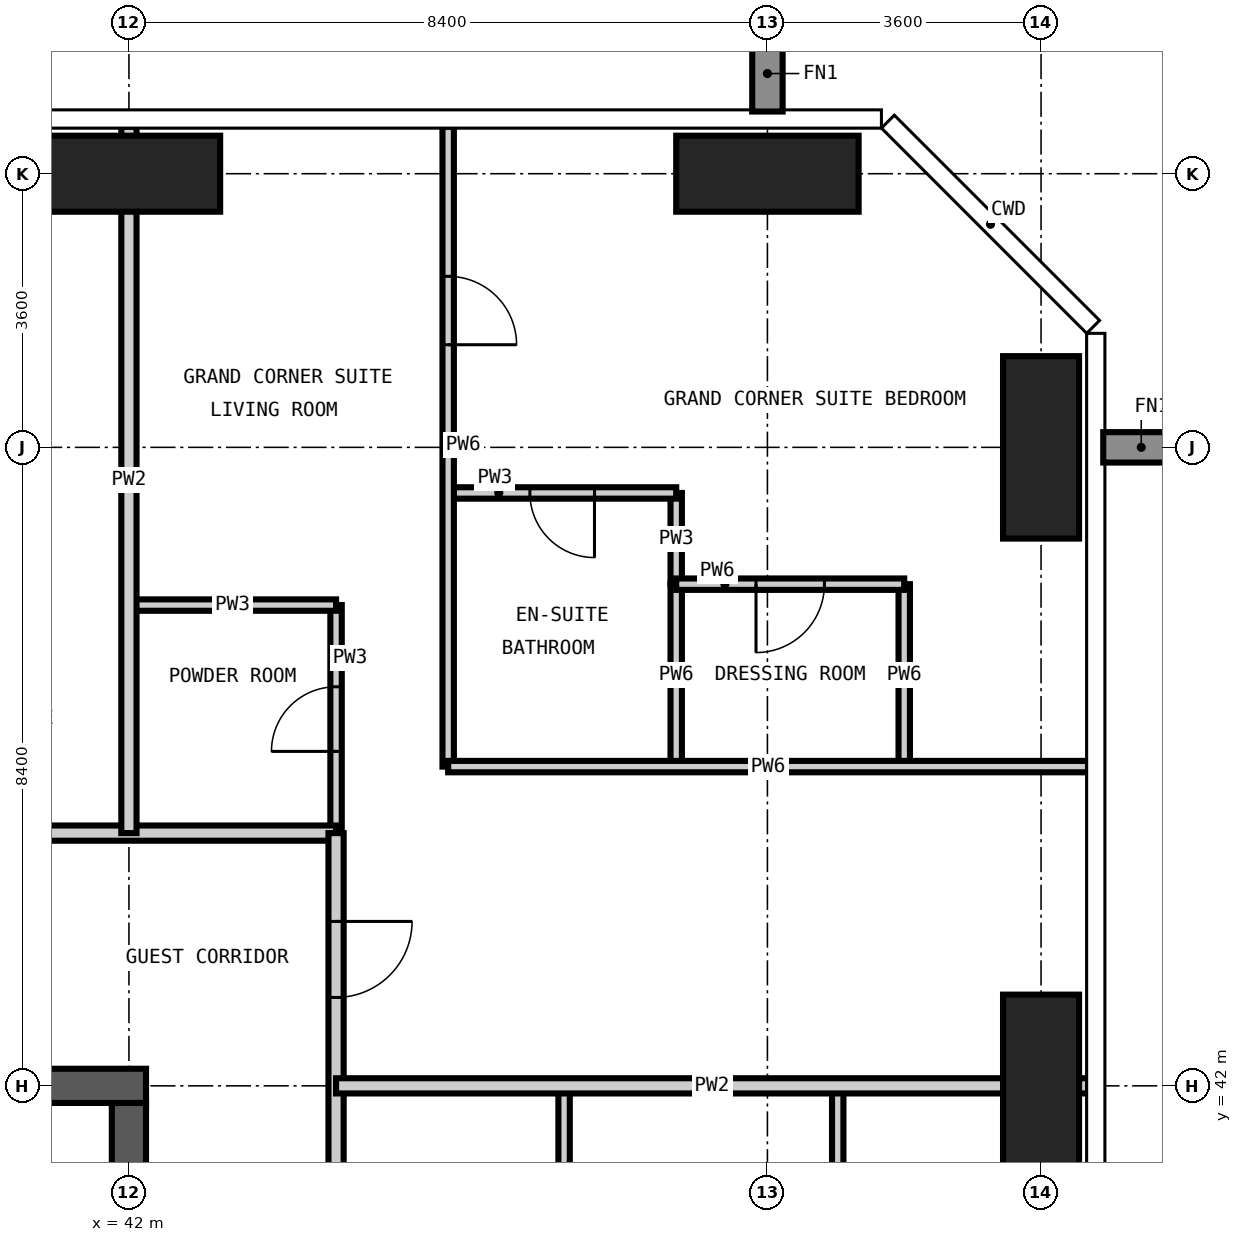
"""IFC4 building model, lengths in metres.
Left out: names, types, materials, properties, quantities, classifications, styles, units other than length and angle.
Written with IfcOpenShell. Run it as: python <this file> out.ifc"""

import sys

from ifc_helpers import new_model, si_unit, direction, frame, frame_2d, origin, origin_2d, place, context, subcontext, project, spatial, rectangle, extrude, element, fill, save


model = new_model("IFC4")
c1 = context("Model", 3, precision=1e-05, world=origin(), true_north=direction((0.0, 1.0)))
c2 = subcontext(c1, "Body", "Model", "MODEL_VIEW")
j1 = project(units=[si_unit("LENGTHUNIT", "METRE"), si_unit("PLANEANGLEUNIT", "RADIAN")], contexts=[c1])
p1 = place(None, origin())
s1 = spatial("IfcSite", under=j1, at=p1, CompositionType="ELEMENT")
p2 = place(p1, origin())
s2 = spatial("IfcBuilding", under=s1, at=p2, CompositionType="ELEMENT")
p3 = place(p2, frame((0.0, 0.0, 252.9)))
s3 = spatial("IfcBuildingStorey", under=s2, at=p3, CompositionType="ELEMENT", Elevation=252.9)
for number, where, z_axis, x_axis in (
    (1, (42.0, 54.0, -0.35), (0.0, 0.0, 1.0), (1.0, 0.0, 0.0)),
    (2, (50.4, 54.0, -0.35), (0.0, 0.0, 1.0), (1.0, 0.0, 0.0)),
):
    element("IfcColumn", number, at=place(p3, frame(where, z_axis=z_axis, x_axis=x_axis)), inside=s3, PredefinedType="COLUMN", context=c2, shape_type="SweptSolid", body=[
        extrude(rectangle(XDim=2.4, YDim=1.0, at=origin_2d()), origin(), (0.0, 0.0, 1.0), 3.9),
    ])
for number, where, z_axis, x_axis in (
    (3, (54.0, 42.0, -0.35), (0.0, 0.0, 1.0), (1.0, 0.0, 0.0)),
    (4, (54.0, 50.4, -0.35), (0.0, 0.0, 1.0), (1.0, 0.0, 0.0)),
):
    element("IfcColumn", number, at=place(p3, frame(where, z_axis=z_axis, x_axis=x_axis)), inside=s3, PredefinedType="COLUMN", context=c2, shape_type="SweptSolid", body=[
        extrude(rectangle(XDim=1.0, YDim=2.4, at=origin_2d()), origin(), (0.0, 0.0, 1.0), 3.9),
    ])
p4 = place(p3, frame((42.0, 17.025, -0.35), z_axis=(0.0, 0.0, 1.0), x_axis=(0.0, 1.0, 0.0)))
e5 = element("IfcWall", 5, at=p4, inside=s3, PredefinedType="SHEAR", context=c2, shape_type="SweptSolid", body=[
    extrude(rectangle(XDim=24.75, YDim=0.45, at=frame_2d((12.375, 0.0))), origin(), (0.0, 0.0, 1.0), 3.9),
])
p5 = place(p4, frame((0.575, 0.0, 0.35)))
e6 = element("IfcOpeningElement", 6, at=p5, cuts=e5, PredefinedType="OPENING", context=c2, shape_type="SweptSolid", body=[
    extrude(rectangle(XDim=1.2, YDim=2.2, at=frame_2d((0.6, 1.1))), frame((0.0, 0.235, 0.0), z_axis=(0.0, -1.0, 0.0), x_axis=(1.0, 0.0, 0.0)), (0.0, 0.0, 1.0), 0.47),
])
p6 = place(p4, frame((11.475, 0.0, 0.35)))
e7 = element("IfcOpeningElement", 7, at=p6, cuts=e5, PredefinedType="OPENING", context=c2, shape_type="SweptSolid", body=[
    extrude(rectangle(XDim=1.8, YDim=2.2, at=frame_2d((0.9, 1.1))), frame((0.0, 0.235, 0.0), z_axis=(0.0, -1.0, 0.0), x_axis=(1.0, 0.0, 0.0)), (0.0, 0.0, 1.0), 0.47),
])
p7 = place(p4, frame((20.275, 0.0, 0.35)))
e8 = element("IfcOpeningElement", 8, at=p7, cuts=e5, PredefinedType="OPENING", context=c2, shape_type="SweptSolid", body=[
    extrude(rectangle(XDim=1.0, YDim=2.1, at=frame_2d((0.5, 1.05))), frame((0.0, 0.235, 0.0), z_axis=(0.0, -1.0, 0.0), x_axis=(1.0, 0.0, 0.0)), (0.0, 0.0, 1.0), 0.47),
])
p8 = place(p3, frame((42.225, 42.0, -0.35), z_axis=(0.0, 0.0, 1.0), x_axis=(-1.0, 0.0, 0.0)))
e9 = element("IfcWall", 9, at=p8, inside=s3, PredefinedType="SHEAR", context=c2, shape_type="SweptSolid", body=[
    extrude(rectangle(XDim=17.25, YDim=0.45, at=frame_2d((8.625, 0.0))), origin(), (0.0, 0.0, 1.0), 3.9),
])
p9 = place(p8, frame((10.125, 0.0, 0.35)))
e10 = element("IfcOpeningElement", 10, at=p9, cuts=e9, PredefinedType="OPENING", context=c2, shape_type="SweptSolid", body=[
    extrude(rectangle(XDim=1.2, YDim=2.2, at=frame_2d((0.6, 1.1))), frame((0.0, 0.235, 0.0), z_axis=(0.0, -1.0, 0.0), x_axis=(1.0, 0.0, 0.0)), (0.0, 0.0, 1.0), 0.47),
])
p10 = place(p3, frame((44.725, 45.325, 0.0), z_axis=(0.0, 0.0, 1.0), x_axis=(0.0, 1.0, 0.0)))
e11 = element("IfcWall", 11, at=p10, inside=s3, PredefinedType="PARTITIONING", context=c2, shape_type="SweptSolid", body=[
    extrude(rectangle(XDim=3.0, YDim=0.15, at=frame_2d((1.5, 0.0))), origin(), (0.0, 0.0, 1.0), 3.55),
])
p11 = place(p10, frame((1.075, 0.0, 0.0)))
e12 = element("IfcOpeningElement", 12, at=p11, cuts=e11, PredefinedType="OPENING", context=c2, shape_type="SweptSolid", body=[
    extrude(rectangle(XDim=0.85, YDim=2.1, at=frame_2d((0.425, 1.05))), frame((0.0, 0.085, 0.0), z_axis=(0.0, -1.0, 0.0), x_axis=(1.0, 0.0, 0.0)), (0.0, 0.0, 1.0), 0.17),
])
p12 = place(p3, frame((47.725, 39.3, 0.0), z_axis=(0.0, 0.0, 1.0), x_axis=(0.0, 1.0, 0.0)))
e13 = element("IfcWall", 13, at=p12, inside=s3, PredefinedType="PARTITIONING", context=c2, shape_type="SweptSolid", body=[
    extrude(rectangle(XDim=2.7, YDim=0.15, at=frame_2d((1.35, 0.0))), origin(), (0.0, 0.0, 1.0), 3.55),
])
p13 = place(p3, frame((49.2, 48.6, 0.0), z_axis=(0.0, 0.0, 1.0), x_axis=(0.0, 1.0, 0.0)))
e14 = element("IfcWall", 14, at=p13, inside=s3, PredefinedType="PARTITIONING", context=c2, shape_type="SweptSolid", body=[
    extrude(rectangle(XDim=1.2, YDim=0.15, at=frame_2d((0.6, 0.0))), origin(), (0.0, 0.0, 1.0), 3.55),
])
p14 = place(p3, frame((51.325, 39.3, 0.0), z_axis=(0.0, 0.0, 1.0), x_axis=(0.0, 1.0, 0.0)))
e15 = element("IfcWall", 15, at=p14, inside=s3, PredefinedType="PARTITIONING", context=c2, shape_type="SweptSolid", body=[
    extrude(rectangle(XDim=2.7, YDim=0.15, at=frame_2d((1.35, 0.0))), origin(), (0.0, 0.0, 1.0), 3.55),
])
p15 = place(p3, frame((42.0, 48.325, 0.0), z_axis=(0.0, 0.0, 1.0), x_axis=(1.0, 0.0, 0.0)))
e16 = element("IfcWall", 16, at=p15, inside=s3, PredefinedType="PARTITIONING", context=c2, shape_type="SweptSolid", body=[
    extrude(rectangle(XDim=2.725, YDim=0.15, at=frame_2d((1.363, 0.0))), origin(), (0.0, 0.0, 1.0), 3.55),
])
p16 = place(p3, frame((46.2, 49.8, 0.0), z_axis=(0.0, 0.0, 1.0), x_axis=(1.0, 0.0, 0.0)))
e17 = element("IfcWall", 17, at=p16, inside=s3, PredefinedType="PARTITIONING", context=c2, shape_type="SweptSolid", body=[
    extrude(rectangle(XDim=3.0, YDim=0.15, at=frame_2d((1.5, 0.0))), origin(), (0.0, 0.0, 1.0), 3.55),
])
p17 = place(p16, frame((1.075, 0.0, 0.0)))
e18 = element("IfcOpeningElement", 18, at=p17, cuts=e17, PredefinedType="OPENING", context=c2, shape_type="SweptSolid", body=[
    extrude(rectangle(XDim=0.85, YDim=2.1, at=frame_2d((0.425, 1.05))), frame((0.0, 0.085, 0.0), z_axis=(0.0, -1.0, 0.0), x_axis=(1.0, 0.0, 0.0)), (0.0, 0.0, 1.0), 0.17),
])
p18 = place(p3, frame((23.075, 45.325, 0.0), z_axis=(0.0, 0.0, 1.0), x_axis=(1.0, 0.0, 0.0)))
e19 = element("IfcWall", 19, at=p18, inside=s3, PredefinedType="PARTITIONING", context=c2, shape_type="SweptSolid", body=[
    extrude(rectangle(XDim=21.65, YDim=0.2, at=frame_2d((10.825, 0.0))), origin(), (0.0, 0.0, 1.0), 3.55),
])
p19 = place(p18, frame((3.725, 0.0, 0.0)))
e20 = element("IfcOpeningElement", 20, at=p19, cuts=e19, PredefinedType="OPENING", context=c2, shape_type="SweptSolid", body=[
    extrude(rectangle(XDim=1.0, YDim=2.2, at=frame_2d((0.5, 1.1))), frame((0.0, 0.11, 0.0), z_axis=(0.0, -1.0, 0.0), x_axis=(1.0, 0.0, 0.0)), (0.0, 0.0, 1.0), 0.22),
])
p20 = place(p18, frame((10.025, 0.0, 0.0)))
e21 = element("IfcOpeningElement", 21, at=p20, cuts=e19, PredefinedType="OPENING", context=c2, shape_type="SweptSolid", body=[
    extrude(rectangle(XDim=1.0, YDim=2.2, at=frame_2d((0.5, 1.1))), frame((0.0, 0.11, 0.0), z_axis=(0.0, -1.0, 0.0), x_axis=(1.0, 0.0, 0.0)), (0.0, 0.0, 1.0), 0.22),
])
p21 = place(p18, frame((16.325, 0.0, 0.0)))
e22 = element("IfcOpeningElement", 22, at=p21, cuts=e19, PredefinedType="OPENING", context=c2, shape_type="SweptSolid", body=[
    extrude(rectangle(XDim=1.0, YDim=2.2, at=frame_2d((0.5, 1.1))), frame((0.0, 0.11, 0.0), z_axis=(0.0, -1.0, 0.0), x_axis=(1.0, 0.0, 0.0)), (0.0, 0.0, 1.0), 0.22),
])
p22 = place(p3, frame((44.725, 45.325, 0.0), z_axis=(0.0, 0.0, 1.0), x_axis=(0.0, -1.0, 0.0)))
e23 = element("IfcWall", 23, at=p22, inside=s3, PredefinedType="PARTITIONING", context=c2, shape_type="SweptSolid", body=[
    extrude(rectangle(XDim=11.725, YDim=0.2, at=frame_2d((5.862, 0.0))), origin(), (0.0, 0.0, 1.0), 3.55),
])
p23 = place(p22, frame((9.125, 0.0, 0.0)))
e24 = element("IfcOpeningElement", 24, at=p23, cuts=e23, PredefinedType="OPENING", context=c2, shape_type="SweptSolid", body=[
    extrude(rectangle(XDim=1.0, YDim=2.2, at=frame_2d((0.5, 1.1))), frame((0.0, 0.11, 0.0), z_axis=(0.0, -1.0, 0.0), x_axis=(1.0, 0.0, 0.0)), (0.0, 0.0, 1.0), 0.22),
])
p24 = place(p22, frame((4.925, 0.0, 0.0)))
e25 = element("IfcOpeningElement", 25, at=p24, cuts=e23, PredefinedType="OPENING", context=c2, shape_type="SweptSolid", body=[
    extrude(rectangle(XDim=1.0, YDim=2.2, at=frame_2d((0.5, 1.1))), frame((0.0, 0.11, 0.0), z_axis=(0.0, -1.0, 0.0), x_axis=(1.0, 0.0, 0.0)), (0.0, 0.0, 1.0), 0.22),
])
p25 = place(p22, frame((1.162, 0.0, 0.0)))
e26 = element("IfcOpeningElement", 26, at=p25, cuts=e23, PredefinedType="OPENING", context=c2, shape_type="SweptSolid", body=[
    extrude(rectangle(XDim=1.0, YDim=2.2, at=frame_2d((0.5, 1.1))), frame((0.0, 0.11, 0.0), z_axis=(0.0, -1.0, 0.0), x_axis=(1.0, 0.0, 0.0)), (0.0, 0.0, 1.0), 0.22),
])
p26 = place(p3, frame((42.0, 45.325, 0.0), z_axis=(0.0, 0.0, 1.0), x_axis=(0.0, 1.0, 0.0)))
e27 = element("IfcWall", 27, at=p26, inside=s3, PredefinedType="PARTITIONING", context=c2, shape_type="SweptSolid", body=[
    extrude(rectangle(XDim=9.293, YDim=0.2, at=frame_2d((4.646, 0.0))), origin(), (0.0, 0.0, 1.0), 3.55),
])
p27 = place(p3, frame((44.725, 42.0, 0.0), z_axis=(0.0, 0.0, 1.0), x_axis=(1.0, 0.0, 0.0)))
e28 = element("IfcWall", 28, at=p27, inside=s3, PredefinedType="PARTITIONING", context=c2, shape_type="SweptSolid", body=[
    extrude(rectangle(XDim=9.893, YDim=0.2, at=frame_2d((4.946, 0.0))), origin(), (0.0, 0.0, 1.0), 3.55),
])
p28 = place(p3, frame((46.2, 46.2, 0.0), z_axis=(0.0, 0.0, 1.0), x_axis=(0.0, 1.0, 0.0)))
e29 = element("IfcWall", 29, at=p28, inside=s3, PredefinedType="PARTITIONING", context=c2, shape_type="SweptSolid", body=[
    extrude(rectangle(XDim=8.418, YDim=0.15, at=frame_2d((4.209, 0.0))), origin(), (0.0, 0.0, 1.0), 3.55),
])
p29 = place(p28, frame((5.55, 0.0, 0.0)))
e30 = element("IfcOpeningElement", 30, at=p29, cuts=e29, PredefinedType="OPENING", context=c2, shape_type="SweptSolid", body=[
    extrude(rectangle(XDim=0.9, YDim=2.1, at=frame_2d((0.45, 1.05))), frame((0.0, 0.085, 0.0), z_axis=(0.0, -1.0, 0.0), x_axis=(1.0, 0.0, 0.0)), (0.0, 0.0, 1.0), 0.17),
])
for number, where, z_axis, x_axis in (
    (31, (49.2, 46.2, 0.0), (0.0, 0.0, 1.0), (0.0, 1.0, 0.0)),
    (32, (52.2, 46.2, 0.0), (0.0, 0.0, 1.0), (0.0, 1.0, 0.0)),
):
    element("IfcWall", number, at=place(p3, frame(where, z_axis=z_axis, x_axis=x_axis)), inside=s3, PredefinedType="PARTITIONING", context=c2, shape_type="SweptSolid", body=[
        extrude(rectangle(XDim=2.4, YDim=0.15, at=frame_2d((1.2, 0.0))), origin(), (0.0, 0.0, 1.0), 3.55),
    ])
p30 = place(p3, frame((46.2, 46.2, 0.0), z_axis=(0.0, 0.0, 1.0), x_axis=(1.0, 0.0, 0.0)))
e33 = element("IfcWall", 33, at=p30, inside=s3, PredefinedType="PARTITIONING", context=c2, shape_type="SweptSolid", body=[
    extrude(rectangle(XDim=8.418, YDim=0.15, at=frame_2d((4.209, 0.0))), origin(), (0.0, 0.0, 1.0), 3.55),
])
p31 = place(p3, frame((49.2, 48.6, 0.0), z_axis=(0.0, 0.0, 1.0), x_axis=(1.0, 0.0, 0.0)))
e34 = element("IfcWall", 34, at=p31, inside=s3, PredefinedType="PARTITIONING", context=c2, shape_type="SweptSolid", body=[
    extrude(rectangle(XDim=3.0, YDim=0.15, at=frame_2d((1.5, 0.0))), origin(), (0.0, 0.0, 1.0), 3.55),
])
p32 = place(p31, frame((1.05, 0.0, 0.0)))
e35 = element("IfcOpeningElement", 35, at=p32, cuts=e34, PredefinedType="OPENING", context=c2, shape_type="SweptSolid", body=[
    extrude(rectangle(XDim=0.9, YDim=2.1, at=frame_2d((0.45, 1.05))), frame((0.0, 0.085, 0.0), z_axis=(0.0, -1.0, 0.0), x_axis=(1.0, 0.0, 0.0)), (0.0, 0.0, 1.0), 0.17),
])
p33 = place(p25, origin())
e36 = element("IfcDoor", 36, at=p33, inside=s3, OperationType="SINGLE_SWING_LEFT", PredefinedType="DOOR", context=c2, shape_type="SweptSolid", body=[
    extrude(rectangle(XDim=1.0, YDim=2.2, at=frame_2d((0.5, 1.1))), frame((0.0, 0.025, 0.0), z_axis=(0.0, -1.0, 0.0), x_axis=(1.0, 0.0, 0.0)), (0.0, 0.0, 1.0), 0.05),
])
fill(e26, e36)
p34 = place(p11, origin())
e37 = element("IfcDoor", 37, at=p34, inside=s3, OperationType="SINGLE_SWING_LEFT", PredefinedType="DOOR", context=c2, shape_type="SweptSolid", body=[
    extrude(rectangle(XDim=0.85, YDim=2.1, at=frame_2d((0.425, 1.05))), frame((0.0, 0.025, 0.0), z_axis=(0.0, -1.0, 0.0), x_axis=(1.0, 0.0, 0.0)), (0.0, 0.0, 1.0), 0.05),
])
fill(e12, e37)
p35 = place(p29, frame((0.9, 0.0, 0.0), z_axis=(0.0, 0.0, 1.0), x_axis=(-1.0, 0.0, 0.0)))
e38 = element("IfcDoor", 38, at=p35, inside=s3, OperationType="SINGLE_SWING_RIGHT", PredefinedType="DOOR", context=c2, shape_type="SweptSolid", body=[
    extrude(rectangle(XDim=0.9, YDim=2.1, at=frame_2d((0.45, 1.05))), frame((0.0, 0.025, 0.0), z_axis=(0.0, -1.0, 0.0), x_axis=(1.0, 0.0, 0.0)), (0.0, 0.0, 1.0), 0.05),
])
fill(e30, e38)
p36 = place(p17, frame((0.85, 0.0, 0.0), z_axis=(0.0, 0.0, 1.0), x_axis=(-1.0, 0.0, 0.0)))
e39 = element("IfcDoor", 39, at=p36, inside=s3, OperationType="SINGLE_SWING_LEFT", PredefinedType="DOOR", context=c2, shape_type="SweptSolid", body=[
    extrude(rectangle(XDim=0.85, YDim=2.1, at=frame_2d((0.425, 1.05))), frame((0.0, 0.025, 0.0), z_axis=(0.0, -1.0, 0.0), x_axis=(1.0, 0.0, 0.0)), (0.0, 0.0, 1.0), 0.05),
])
fill(e18, e39)
p37 = place(p32, frame((0.9, 0.0, 0.0), z_axis=(0.0, 0.0, 1.0), x_axis=(-1.0, 0.0, 0.0)))
e40 = element("IfcDoor", 40, at=p37, inside=s3, OperationType="SINGLE_SWING_RIGHT", PredefinedType="DOOR", context=c2, shape_type="SweptSolid", body=[
    extrude(rectangle(XDim=0.9, YDim=2.1, at=frame_2d((0.45, 1.05))), frame((0.0, 0.025, 0.0), z_axis=(0.0, -1.0, 0.0), x_axis=(1.0, 0.0, 0.0)), (0.0, 0.0, 1.0), 0.05),
])
fill(e35, e40)
save(model, sys.argv[1])
